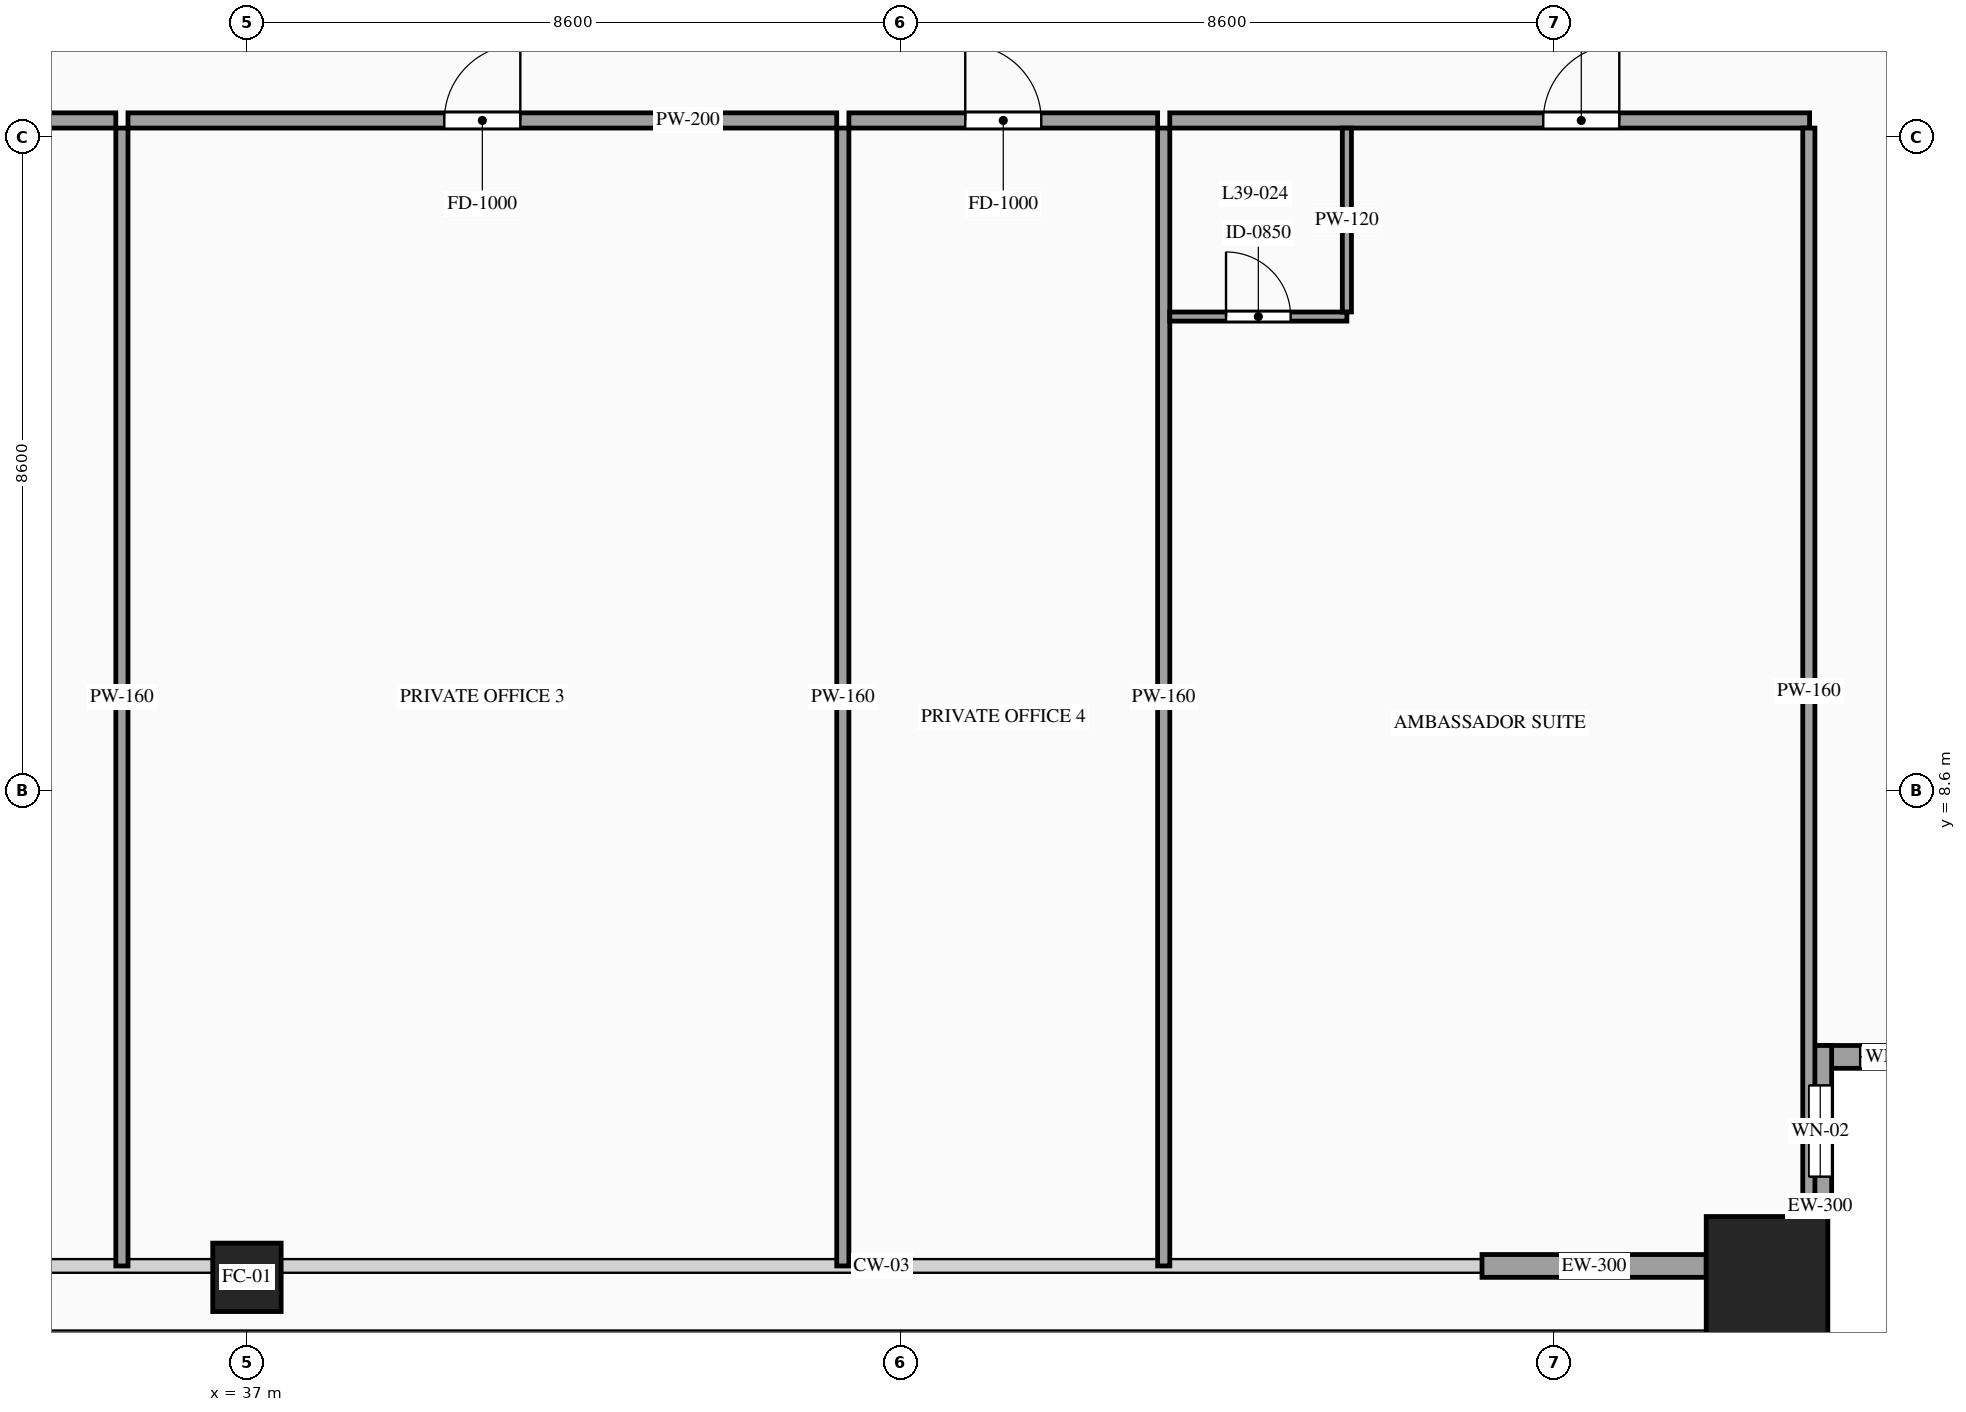
"""IFC4 building model, lengths in metres.
Left out: names, types, materials, properties, quantities, classifications, styles, units other than length and angle.
Written with IfcOpenShell. Run it as: python <this file> out.ifc"""

import sys

from ifc_helpers import new_model, si_unit, direction, frame, frame_2d, origin, origin_2d, place, context, subcontext, project, spatial, rectangle, hollow_rectangle, extrude, source, transform, mapped, element, fill, save


model = new_model("IFC4")
c1 = context("Model", 3, precision=1e-05, world=origin(), true_north=direction((0.0, 1.0)))
c2 = subcontext(c1, "Body", "Model", "MODEL_VIEW")
j1 = project(units=[si_unit("LENGTHUNIT", "METRE"), si_unit("PLANEANGLEUNIT", "RADIAN")], contexts=[c1])
p1 = place(None, origin())
s1 = spatial("IfcSite", under=j1, at=p1, CompositionType="ELEMENT")
p2 = place(p1, origin())
s2 = spatial("IfcBuilding", under=s1, at=p2, CompositionType="ELEMENT")
p3 = place(p2, frame((0.0, 0.0, 148.8)))
s3 = spatial("IfcBuildingStorey", under=s2, at=p3, CompositionType="ELEMENT", Elevation=148.8)
m1 = source(origin(), c2, "Body", "SweptSolid", [
    extrude(hollow_rectangle(XDim=0.9, YDim=0.9, WallThickness=0.042, at=origin_2d()), origin(), (0.0, 0.0, 1.0), 3.6),
])
p4 = place(p3, frame((37.0, 2.2, 0.0), z_axis=(0.0, 0.0, 1.0), x_axis=(1.0, 0.0, 0.0)))
e1 = element("IfcColumn", 1, at=p4, inside=s3, PredefinedType="COLUMN", context=c2, shape_type="MappedRepresentation", body=[
    mapped(m1, transform((0.0, 0.0, 0.0), scale=1.0)),
])
m2 = source(origin(), c2, "Body", "SweptSolid", [
    extrude(hollow_rectangle(XDim=1.6, YDim=1.6, WallThickness=0.07, at=origin_2d()), origin(), (0.0, 0.0, 1.0), 3.6),
])
p5 = place(p3, frame((57.0, 2.2, 0.0), z_axis=(0.0, 0.0, 1.0), x_axis=(1.0, 0.0, 0.0)))
e2 = element("IfcColumn", 2, at=p5, inside=s3, PredefinedType="COLUMN", context=c2, shape_type="MappedRepresentation", body=[
    mapped(m2, transform((0.0, 0.0, 0.0), scale=1.0)),
])
p6 = place(p3, frame((57.55, 5.1, 0.0), z_axis=(0.0, 0.0, 1.0), x_axis=(1.0, 0.0, 0.0)))
e3 = element("IfcWall", 3, at=p6, inside=s3, PredefinedType="SOLIDWALL", context=c2, shape_type="SweptSolid", body=[
    extrude(rectangle(XDim=2.25, YDim=0.3, at=frame_2d((1.125, 0.0))), origin(), (0.0, 0.0, 1.0), 3.38),
])
p7 = place(p6, frame((0.675, 0.0, 0.85)))
e4 = element("IfcOpeningElement", 4, at=p7, cuts=e3, PredefinedType="OPENING", context=c2, shape_type="SweptSolid", body=[
    extrude(rectangle(XDim=0.9, YDim=1.5, at=frame_2d((0.45, 0.75))), frame((0.0, 0.165, 0.0), z_axis=(0.0, -1.0, 0.0), x_axis=(1.0, 0.0, 0.0)), (0.0, 0.0, 1.0), 0.33),
])
p8 = place(p3, frame((57.7, 3.0, 0.0), z_axis=(0.0, 0.0, 1.0), x_axis=(0.0, 1.0, 0.0)))
e5 = element("IfcWall", 5, at=p8, inside=s3, PredefinedType="SOLIDWALL", context=c2, shape_type="SweptSolid", body=[
    extrude(rectangle(XDim=2.25, YDim=0.3, at=frame_2d((1.125, 0.0))), origin(), (0.0, 0.0, 1.0), 3.38),
])
p9 = place(p8, frame((0.525, 0.0, 0.85)))
e6 = element("IfcOpeningElement", 6, at=p9, cuts=e5, PredefinedType="OPENING", context=c2, shape_type="SweptSolid", body=[
    extrude(rectangle(XDim=1.2, YDim=2.1, at=frame_2d((0.6, 1.05))), frame((0.0, 0.165, 0.0), z_axis=(0.0, -1.0, 0.0), x_axis=(1.0, 0.0, 0.0)), (0.0, 0.0, 1.0), 0.33),
])
m3 = source(origin(), c2, "Body", "SweptSolid", [
    extrude(rectangle(XDim=2.95, YDim=0.3, at=frame_2d((1.475, 0.0))), origin(), (0.0, 0.0, 1.0), 2.775),
])
p10 = place(p3, frame((53.25, 2.35, 0.0), z_axis=(0.0, 0.0, 1.0), x_axis=(1.0, 0.0, 0.0)))
e7 = element("IfcWall", 7, at=p10, inside=s3, PredefinedType="SOLIDWALL", context=c2, shape_type="MappedRepresentation", body=[
    mapped(m3, transform((0.0, 0.0, 0.0), scale=1.0)),
])
p11 = place(p3, frame((31.214, 17.42, 0.0), z_axis=(0.0, 0.0, 1.0), x_axis=(1.0, 0.0, 0.0)))
e8 = element("IfcWall", 8, at=p11, inside=s3, PredefinedType="PARTITIONING", context=c2, shape_type="SweptSolid", body=[
    extrude(rectangle(XDim=4.061, YDim=0.2, at=frame_2d((2.03, 0.0))), origin(), (0.0, 0.0, 1.0), 3.38),
])
p12 = place(p11, frame((1.531, 0.0, 0.0)))
e9 = element("IfcOpeningElement", 9, at=p12, cuts=e8, PredefinedType="OPENING", context=c2, shape_type="SweptSolid", body=[
    extrude(rectangle(XDim=1.0, YDim=2.2, at=frame_2d((0.5, 1.1))), frame((0.0, 0.115, 0.0), z_axis=(0.0, -1.0, 0.0), x_axis=(1.0, 0.0, 0.0)), (0.0, 0.0, 1.0), 0.23),
])
m4 = source(origin(), c2, "Body", "SweptSolid", [
    extrude(rectangle(XDim=14.97, YDim=0.16, at=frame_2d((7.485, 0.0))), origin(), (0.0, 0.0, 1.0), 3.38),
])
p13 = place(p3, frame((35.355, 2.35, 0.0), z_axis=(0.0, 0.0, 1.0), x_axis=(0.0, 1.0, 0.0)))
e10 = element("IfcWall", 10, at=p13, inside=s3, PredefinedType="PARTITIONING", context=c2, shape_type="MappedRepresentation", body=[
    mapped(m4, transform((0.0, 0.0, 0.0), scale=1.0)),
])
p14 = place(p3, frame((35.435, 17.42, 0.0), z_axis=(0.0, 0.0, 1.0), x_axis=(1.0, 0.0, 0.0)))
e11 = element("IfcWall", 11, at=p14, inside=s3, PredefinedType="PARTITIONING", context=c2, shape_type="SweptSolid", body=[
    extrude(rectangle(XDim=9.325, YDim=0.2, at=frame_2d((4.663, 0.0))), origin(), (0.0, 0.0, 1.0), 3.38),
])
p15 = place(p14, frame((4.162, 0.0, 0.0)))
e12 = element("IfcOpeningElement", 12, at=p15, cuts=e11, PredefinedType="OPENING", context=c2, shape_type="SweptSolid", body=[
    extrude(rectangle(XDim=1.0, YDim=2.2, at=frame_2d((0.5, 1.1))), frame((0.0, 0.115, 0.0), z_axis=(0.0, -1.0, 0.0), x_axis=(1.0, 0.0, 0.0)), (0.0, 0.0, 1.0), 0.23),
])
p16 = place(p3, frame((44.84, 2.35, 0.0), z_axis=(0.0, 0.0, 1.0), x_axis=(0.0, 1.0, 0.0)))
e13 = element("IfcWall", 13, at=p16, inside=s3, PredefinedType="PARTITIONING", context=c2, shape_type="MappedRepresentation", body=[
    mapped(m4, transform((0.0, 0.0, 0.0), scale=1.0)),
])
p17 = place(p3, frame((44.92, 17.42, 0.0), z_axis=(0.0, 0.0, 1.0), x_axis=(1.0, 0.0, 0.0)))
e14 = element("IfcWall", 14, at=p17, inside=s3, PredefinedType="PARTITIONING", context=c2, shape_type="SweptSolid", body=[
    extrude(rectangle(XDim=4.062, YDim=0.2, at=frame_2d((2.031, 0.0))), origin(), (0.0, 0.0, 1.0), 3.38),
])
p18 = place(p17, frame((1.531, 0.0, 0.0)))
e15 = element("IfcOpeningElement", 15, at=p18, cuts=e14, PredefinedType="OPENING", context=c2, shape_type="SweptSolid", body=[
    extrude(rectangle(XDim=1.0, YDim=2.2, at=frame_2d((0.5, 1.1))), frame((0.0, 0.115, 0.0), z_axis=(0.0, -1.0, 0.0), x_axis=(1.0, 0.0, 0.0)), (0.0, 0.0, 1.0), 0.23),
])
p19 = place(p3, frame((49.062, 2.35, 0.0), z_axis=(0.0, 0.0, 1.0), x_axis=(0.0, 1.0, 0.0)))
e16 = element("IfcWall", 16, at=p19, inside=s3, PredefinedType="PARTITIONING", context=c2, shape_type="MappedRepresentation", body=[
    mapped(m4, transform((0.0, 0.0, 0.0), scale=1.0)),
])
p20 = place(p3, frame((49.142, 17.42, 0.0), z_axis=(0.0, 0.0, 1.0), x_axis=(1.0, 0.0, 0.0)))
e17 = element("IfcWall", 17, at=p20, inside=s3, PredefinedType="PARTITIONING", context=c2, shape_type="SweptSolid", body=[
    extrude(rectangle(XDim=8.418, YDim=0.2, at=frame_2d((4.209, 0.0))), origin(), (0.0, 0.0, 1.0), 3.38),
])
p21 = place(p20, frame((4.914, 0.0, 0.0)))
e18 = element("IfcOpeningElement", 18, at=p21, cuts=e17, PredefinedType="OPENING", context=c2, shape_type="SweptSolid", body=[
    extrude(rectangle(XDim=1.0, YDim=2.2, at=frame_2d((0.5, 1.1))), frame((0.0, 0.115, 0.0), z_axis=(0.0, -1.0, 0.0), x_axis=(1.0, 0.0, 0.0)), (0.0, 0.0, 1.0), 0.23),
])
m5 = source(origin(), c2, "Body", "SweptSolid", [
    extrude(rectangle(XDim=14.82, YDim=0.16, at=frame_2d((7.41, 0.0))), origin(), (0.0, 0.0, 1.0), 3.38),
])
p22 = place(p3, frame((57.55, 2.5, 0.0), z_axis=(0.0, 0.0, 1.0), x_axis=(0.0, 1.0, 0.0)))
e19 = element("IfcWall", 19, at=p22, inside=s3, PredefinedType="PARTITIONING", context=c2, shape_type="MappedRepresentation", body=[
    mapped(m5, transform((0.0, 0.0, 0.0), scale=1.0)),
])
p23 = place(p3, frame((49.142, 14.84, 0.0), z_axis=(0.0, 0.0, 1.0), x_axis=(1.0, 0.0, 0.0)))
e20 = element("IfcWall", 20, at=p23, inside=s3, PredefinedType="PARTITIONING", context=c2, shape_type="SweptSolid", body=[
    extrude(rectangle(XDim=2.33, YDim=0.12, at=frame_2d((1.165, 0.0))), origin(), (0.0, 0.0, 1.0), 3.38),
])
p24 = place(p23, frame((0.74, 0.0, 0.0)))
e21 = element("IfcOpeningElement", 21, at=p24, cuts=e20, PredefinedType="OPENING", context=c2, shape_type="SweptSolid", body=[
    extrude(rectangle(XDim=0.85, YDim=2.1, at=frame_2d((0.425, 1.05))), frame((0.0, 0.075, 0.0), z_axis=(0.0, -1.0, 0.0), x_axis=(1.0, 0.0, 0.0)), (0.0, 0.0, 1.0), 0.15),
])
m6 = source(origin(), c2, "Body", "SweptSolid", [
    extrude(rectangle(XDim=2.42, YDim=0.12, at=frame_2d((1.21, 0.0))), origin(), (0.0, 0.0, 1.0), 3.38),
])
p25 = place(p3, frame((51.472, 14.9, 0.0), z_axis=(0.0, 0.0, 1.0), x_axis=(0.0, 1.0, 0.0)))
e22 = element("IfcWall", 22, at=p25, inside=s3, PredefinedType="PARTITIONING", context=c2, shape_type="MappedRepresentation", body=[
    mapped(m6, transform((0.0, 0.0, 0.0), scale=1.0)),
])
m7 = source(origin(), c2, "Body", "SweptSolid", [
    extrude(rectangle(XDim=0.9, YDim=1.5, at=frame_2d((0.45, 0.75))), frame((0.0, 0.03, 0.0), z_axis=(0.0, -1.0, 0.0), x_axis=(1.0, 0.0, 0.0)), (0.0, 0.0, 1.0), 0.06),
])
p26 = place(p7, origin())
e23 = element("IfcWindow", 23, at=p26, inside=s3, PartitioningType="SINGLE_PANEL", PredefinedType="WINDOW", context=c2, shape_type="MappedRepresentation", body=[
    mapped(m7, transform((0.0, 0.0, 0.0), scale=1.0)),
])
fill(e4, e23)
m8 = source(origin(), c2, "Body", "SweptSolid", [
    extrude(rectangle(XDim=1.2, YDim=2.1, at=frame_2d((0.6, 1.05))), frame((0.0, 0.03, 0.0), z_axis=(0.0, -1.0, 0.0), x_axis=(1.0, 0.0, 0.0)), (0.0, 0.0, 1.0), 0.06),
])
p27 = place(p9, origin())
e24 = element("IfcWindow", 24, at=p27, inside=s3, PartitioningType="SINGLE_PANEL", PredefinedType="WINDOW", context=c2, shape_type="MappedRepresentation", body=[
    mapped(m8, transform((0.0, 0.0, 0.0), scale=1.0)),
])
fill(e6, e24)
m9 = source(origin(), c2, "Body", "SweptSolid", [
    extrude(rectangle(XDim=1.0, YDim=2.2, at=frame_2d((0.5, 1.1))), frame((0.0, 0.025, 0.0), z_axis=(0.0, -1.0, 0.0), x_axis=(1.0, 0.0, 0.0)), (0.0, 0.0, 1.0), 0.05),
])
p28 = place(p15, origin())
e25 = element("IfcDoor", 25, at=p28, inside=s3, OperationType="SINGLE_SWING_RIGHT", PredefinedType="DOOR", context=c2, shape_type="MappedRepresentation", body=[
    mapped(m9, transform((0.0, 0.0, 0.0), scale=1.0)),
])
fill(e12, e25)
p29 = place(p18, origin())
e26 = element("IfcDoor", 26, at=p29, inside=s3, OperationType="SINGLE_SWING_LEFT", PredefinedType="DOOR", context=c2, shape_type="MappedRepresentation", body=[
    mapped(m9, transform((0.0, 0.0, 0.0), scale=1.0)),
])
fill(e15, e26)
p30 = place(p21, origin())
e27 = element("IfcDoor", 27, at=p30, inside=s3, OperationType="SINGLE_SWING_RIGHT", PredefinedType="DOOR", context=c2, shape_type="MappedRepresentation", body=[
    mapped(m9, transform((0.0, 0.0, 0.0), scale=1.0)),
])
fill(e18, e27)
m10 = source(origin(), c2, "Body", "SweptSolid", [
    extrude(rectangle(XDim=0.85, YDim=2.1, at=frame_2d((0.425, 1.05))), frame((0.0, 0.025, 0.0), z_axis=(0.0, -1.0, 0.0), x_axis=(1.0, 0.0, 0.0)), (0.0, 0.0, 1.0), 0.05),
])
p31 = place(p24, origin())
e28 = element("IfcDoor", 28, at=p31, inside=s3, OperationType="SINGLE_SWING_LEFT", PredefinedType="DOOR", context=c2, shape_type="MappedRepresentation", body=[
    mapped(m10, transform((0.0, 0.0, 0.0), scale=1.0)),
])
fill(e21, e28)
save(model, sys.argv[1])
